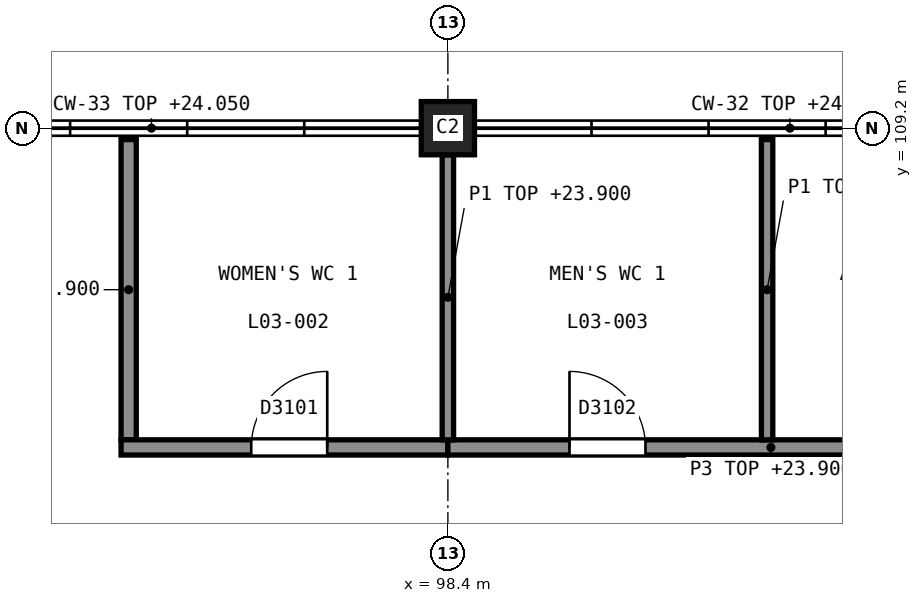
"""IFC4 building model, lengths in metres.
Left out: names, types, materials, properties, quantities, classifications, styles, units other than length and angle.
Written with IfcOpenShell. Run it as: python <this file> out.ifc"""

import sys

from ifc_helpers import new_model, si_unit, direction, frame, frame_2d, origin, origin_2d, place, context, subcontext, project, spatial, rectangle, extrude, element, fill, save


model = new_model("IFC4")
c1 = context("Model", 3, precision=1e-05, world=origin(), true_north=direction((0.0, 1.0)))
c2 = subcontext(c1, "Body", "Model", "MODEL_VIEW")
j1 = project(units=[si_unit("LENGTHUNIT", "METRE"), si_unit("PLANEANGLEUNIT", "RADIAN")], contexts=[c1])
p1 = place(None, origin())
s1 = spatial("IfcSite", under=j1, at=p1, CompositionType="ELEMENT")
p2 = place(p1, origin())
s2 = spatial("IfcBuilding", under=s1, at=p2, CompositionType="ELEMENT")
p3 = place(p2, frame((0.0, 0.0, 20.0)))
s3 = spatial("IfcBuildingStorey", under=s2, at=p3, CompositionType="ELEMENT", Elevation=20.0)
p4 = place(p3, frame((98.4, 109.2, 0.0), z_axis=(0.0, 0.0, 1.0), x_axis=(1.0, 0.0, 0.0)))
e1 = element("IfcColumn", 1, at=p4, inside=s3, PredefinedType="COLUMN", context=c2, shape_type="SweptSolid", body=[
    extrude(rectangle(XDim=0.7, YDim=0.7, at=origin_2d()), origin(), (0.0, 0.0, 1.0), 5.0),
])
p5 = place(p3, frame((94.2, 105.1, 0.0), z_axis=(0.0, 0.0, 1.0), x_axis=(0.0, 1.0, 0.0)))
e2 = element("IfcWall", 2, at=p5, inside=s3, PredefinedType="PARTITIONING", context=c2, shape_type="SweptSolid", body=[
    extrude(rectangle(XDim=3.95, YDim=0.2, at=frame_2d((1.975, 0.0))), origin(), (0.0, 0.0, 1.0), 3.9),
])
p6 = place(p3, frame((94.1, 105.0, 0.0), z_axis=(0.0, 0.0, 1.0), x_axis=(1.0, 0.0, 0.0)))
e3 = element("IfcWall", 3, at=p6, inside=s3, PredefinedType="PARTITIONING", context=c2, shape_type="SweptSolid", body=[
    extrude(rectangle(XDim=4.3, YDim=0.2, at=frame_2d((2.15, 0.0))), origin(), (0.0, 0.0, 1.0), 3.9),
])
p7 = place(p6, frame((1.712, 0.0, 0.0)))
e4 = element("IfcOpeningElement", 4, at=p7, cuts=e3, PredefinedType="OPENING", context=c2, shape_type="SweptSolid", body=[
    extrude(rectangle(XDim=1.0, YDim=2.1, at=frame_2d((0.5, 1.05))), frame((0.0, 0.11, 0.0), z_axis=(0.0, -1.0, 0.0), x_axis=(1.0, 0.0, 0.0)), (0.0, 0.0, 1.0), 0.22),
])
p8 = place(p3, frame((98.4, 105.0, 0.0), z_axis=(0.0, 0.0, 1.0), x_axis=(1.0, 0.0, 0.0)))
e5 = element("IfcWall", 5, at=p8, inside=s3, PredefinedType="PARTITIONING", context=c2, shape_type="SweptSolid", body=[
    extrude(rectangle(XDim=8.5, YDim=0.2, at=frame_2d((4.25, 0.0))), origin(), (0.0, 0.0, 1.0), 3.9),
])
p9 = place(p8, frame((1.6, 0.0, 0.0)))
e6 = element("IfcOpeningElement", 6, at=p9, cuts=e5, PredefinedType="OPENING", context=c2, shape_type="SweptSolid", body=[
    extrude(rectangle(XDim=1.0, YDim=2.1, at=frame_2d((0.5, 1.05))), frame((0.0, 0.11, 0.0), z_axis=(0.0, -1.0, 0.0), x_axis=(1.0, 0.0, 0.0)), (0.0, 0.0, 1.0), 0.22),
])
p10 = place(p8, frame((5.788, 0.0, 0.0)))
e7 = element("IfcOpeningElement", 7, at=p10, cuts=e5, PredefinedType="OPENING", context=c2, shape_type="SweptSolid", body=[
    extrude(rectangle(XDim=1.0, YDim=2.1, at=frame_2d((0.5, 1.05))), frame((0.0, 0.11, 0.0), z_axis=(0.0, -1.0, 0.0), x_axis=(1.0, 0.0, 0.0)), (0.0, 0.0, 1.0), 0.22),
])
p11 = place(p3, frame((98.4, 105.1, 0.0), z_axis=(0.0, 0.0, 1.0), x_axis=(0.0, 1.0, 0.0)))
e8 = element("IfcWall", 8, at=p11, inside=s3, PredefinedType="PARTITIONING", context=c2, shape_type="SweptSolid", body=[
    extrude(rectangle(XDim=3.75, YDim=0.15, at=frame_2d((1.875, 0.0))), origin(), (0.0, 0.0, 1.0), 3.9),
])
p12 = place(p3, frame((102.6, 105.1, 0.0), z_axis=(0.0, 0.0, 1.0), x_axis=(0.0, 1.0, 0.0)))
e9 = element("IfcWall", 9, at=p12, inside=s3, PredefinedType="PARTITIONING", context=c2, shape_type="SweptSolid", body=[
    extrude(rectangle(XDim=3.95, YDim=0.15, at=frame_2d((1.975, 0.0))), origin(), (0.0, 0.0, 1.0), 3.9),
])
p13 = place(p7, origin())
e10 = element("IfcDoor", 10, at=p13, inside=s3, OperationType="SINGLE_SWING_LEFT", PredefinedType="DOOR", context=c2, shape_type="SweptSolid", body=[
    extrude(rectangle(XDim=1.0, YDim=2.1, at=frame_2d((0.5, 1.05))), frame((0.0, 0.025, 0.0), z_axis=(0.0, -1.0, 0.0), x_axis=(1.0, 0.0, 0.0)), (0.0, 0.0, 1.0), 0.05),
])
fill(e4, e10)
p14 = place(p9, origin())
e11 = element("IfcDoor", 11, at=p14, inside=s3, OperationType="SINGLE_SWING_RIGHT", PredefinedType="DOOR", context=c2, shape_type="SweptSolid", body=[
    extrude(rectangle(XDim=1.0, YDim=2.1, at=frame_2d((0.5, 1.05))), frame((0.0, 0.025, 0.0), z_axis=(0.0, -1.0, 0.0), x_axis=(1.0, 0.0, 0.0)), (0.0, 0.0, 1.0), 0.05),
])
fill(e6, e11)
save(model, sys.argv[1])
